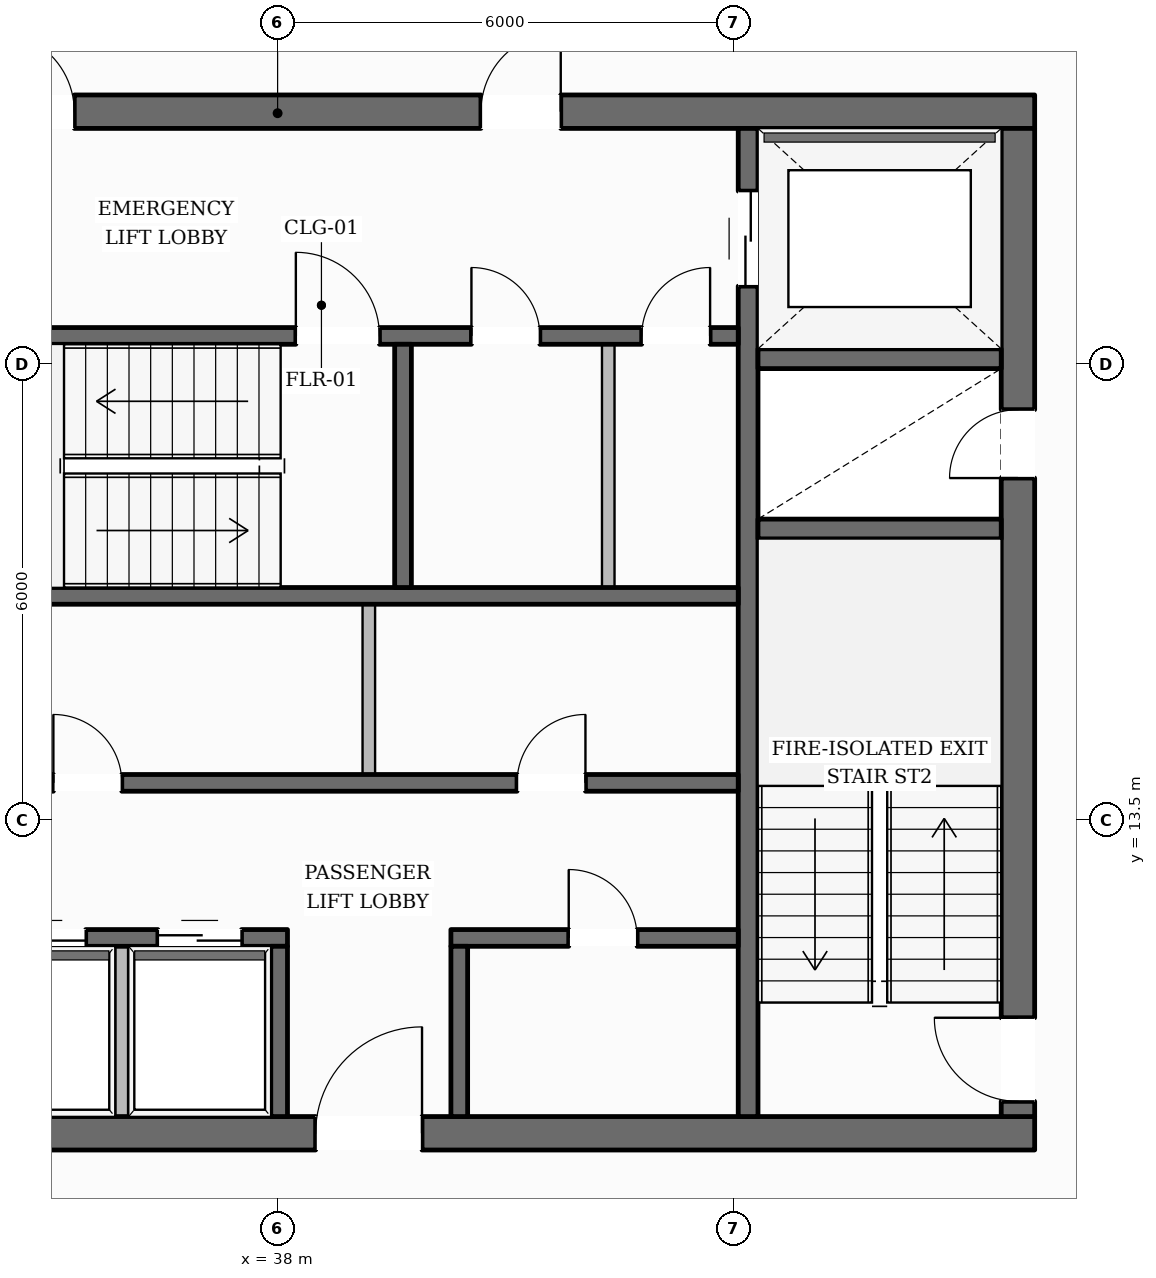
"""IFC4 building model, lengths in metres.
Left out: names, types, materials, properties, quantities, classifications, styles, units other than length and angle.
Written with IfcOpenShell. Run it as: python <this file> out.ifc"""

import sys

from ifc_helpers import new_model, si_unit, direction, frame, frame_2d, origin, place, context, subcontext, project, spatial, rectangle, extrude, element, fill, save


model = new_model("IFC4")
c1 = context("Model", 3, precision=1e-05, world=origin(), true_north=direction((0.0, 1.0)))
c2 = subcontext(c1, "Body", "Model", "MODEL_VIEW")
j1 = project(units=[si_unit("LENGTHUNIT", "METRE"), si_unit("PLANEANGLEUNIT", "RADIAN")], contexts=[c1])
p1 = place(None, origin())
s1 = spatial("IfcSite", under=j1, at=p1, CompositionType="ELEMENT")
p2 = place(p1, origin())
s2 = spatial("IfcBuilding", under=s1, at=p2, CompositionType="ELEMENT")
p3 = place(p2, frame((0.0, 0.0, 188.1)))
s3 = spatial("IfcBuildingStorey", under=s2, at=p3, CompositionType="ELEMENT", Elevation=188.1)
p4 = place(p3, frame((28.04, 9.38, 0.0), z_axis=(0.0, 0.0, 1.0), x_axis=(1.0, 0.0, 0.0)))
e1 = element("IfcWall", 1, at=p4, inside=s3, PredefinedType="SOLIDWALL", context=c2, shape_type="SweptSolid", body=[
    extrude(rectangle(XDim=19.92, YDim=0.44, at=frame_2d((9.96, 0.0))), origin(), (0.0, 0.0, 1.0), 3.6),
])
p5 = place(p4, frame((10.46, 0.0, 0.0)))
e2 = element("IfcOpeningElement", 2, at=p5, cuts=e1, PredefinedType="OPENING", context=c2, shape_type="SweptSolid", body=[
    extrude(rectangle(XDim=1.4, YDim=2.2, at=frame_2d((0.7, 1.1))), frame((0.0, 0.23, 0.0), z_axis=(0.0, -1.0, 0.0), x_axis=(1.0, 0.0, 0.0)), (0.0, 0.0, 1.0), 0.46),
])
p6 = place(p3, frame((28.04, 22.82, 0.0), z_axis=(0.0, 0.0, 1.0), x_axis=(1.0, 0.0, 0.0)))
e3 = element("IfcWall", 3, at=p6, inside=s3, PredefinedType="SOLIDWALL", context=c2, shape_type="SweptSolid", body=[
    extrude(rectangle(XDim=19.92, YDim=0.44, at=frame_2d((9.96, 0.0))), origin(), (0.0, 0.0, 1.0), 3.6),
])
p7 = place(p6, frame((6.235, 0.0, 0.0)))
e4 = element("IfcOpeningElement", 4, at=p7, cuts=e3, PredefinedType="OPENING", context=c2, shape_type="SweptSolid", body=[
    extrude(rectangle(XDim=1.05, YDim=2.15, at=frame_2d((0.525, 1.075))), frame((0.0, 0.23, 0.0), z_axis=(0.0, -1.0, 0.0), x_axis=(1.0, 0.0, 0.0)), (0.0, 0.0, 1.0), 0.46),
])
p8 = place(p6, frame((12.635, 0.0, 0.0)))
e5 = element("IfcOpeningElement", 5, at=p8, cuts=e3, PredefinedType="OPENING", context=c2, shape_type="SweptSolid", body=[
    extrude(rectangle(XDim=1.05, YDim=2.15, at=frame_2d((0.525, 1.075))), frame((0.0, 0.23, 0.0), z_axis=(0.0, -1.0, 0.0), x_axis=(1.0, 0.0, 0.0)), (0.0, 0.0, 1.0), 0.46),
])
p9 = place(p3, frame((47.74, 9.6, 0.0), z_axis=(0.0, 0.0, 1.0), x_axis=(0.0, 1.0, 0.0)))
e6 = element("IfcWall", 6, at=p9, inside=s3, PredefinedType="SOLIDWALL", context=c2, shape_type="SweptSolid", body=[
    extrude(rectangle(XDim=13.0, YDim=0.44, at=frame_2d((6.5, 0.0))), origin(), (0.0, 0.0, 1.0), 3.6),
])
p10 = place(p9, frame((0.2, 0.0, 0.0)))
e7 = element("IfcOpeningElement", 7, at=p10, cuts=e6, PredefinedType="OPENING", context=c2, shape_type="SweptSolid", body=[
    extrude(rectangle(XDim=1.1, YDim=2.15, at=frame_2d((0.55, 1.075))), frame((0.0, 0.23, 0.0), z_axis=(0.0, -1.0, 0.0), x_axis=(1.0, 0.0, 0.0)), (0.0, 0.0, 1.0), 0.46),
])
p11 = place(p9, frame((8.4, 0.0, 0.0)))
e8 = element("IfcOpeningElement", 8, at=p11, cuts=e6, PredefinedType="OPENING", context=c2, shape_type="SweptSolid", body=[
    extrude(rectangle(XDim=0.9, YDim=2.1, at=frame_2d((0.45, 1.05))), frame((0.0, 0.23, 0.0), z_axis=(0.0, -1.0, 0.0), x_axis=(1.0, 0.0, 0.0)), (0.0, 0.0, 1.0), 0.46),
])
p12 = place(p3, frame((44.19, 9.6, 0.0), z_axis=(0.0, 0.0, 1.0), x_axis=(0.0, 1.0, 0.0)))
e9 = element("IfcWall", 9, at=p12, inside=s3, PredefinedType="SHEAR", context=c2, shape_type="SweptSolid", body=[
    extrude(rectangle(XDim=13.0, YDim=0.26, at=frame_2d((6.5, 0.0))), origin(), (0.0, 0.0, 1.0), 3.6),
])
p13 = place(p12, frame((10.925, 0.0, 0.0)))
e10 = element("IfcOpeningElement", 10, at=p13, cuts=e9, PredefinedType="OPENING", context=c2, shape_type="SweptSolid", body=[
    extrude(rectangle(XDim=1.25, YDim=2.25, at=frame_2d((0.625, 1.125))), frame((0.0, 0.14, 0.0), z_axis=(0.0, -1.0, 0.0), x_axis=(1.0, 0.0, 0.0)), (0.0, 0.0, 1.0), 0.28),
])
for number, where, z_axis, x_axis in (
    (11, (44.32, 17.33, 0.0), (0.0, 0.0, 1.0), (1.0, 0.0, 0.0)),
    (12, (44.32, 19.57, 0.0), (0.0, 0.0, 1.0), (1.0, 0.0, 0.0)),
):
    element("IfcWall", number, at=place(p3, frame(where, z_axis=z_axis, x_axis=x_axis)), inside=s3, PredefinedType="SHEAR", context=c2, shape_type="SweptSolid", body=[
        extrude(rectangle(XDim=3.2, YDim=0.26, at=frame_2d((1.6, 0.0))), origin(), (0.0, 0.0, 1.0), 3.6),
    ])
p14 = place(p3, frame((31.94, 19.87, 0.0), z_axis=(0.0, 0.0, 1.0), x_axis=(1.0, 0.0, 0.0)))
e13 = element("IfcWall", 13, at=p14, inside=s3, PredefinedType="SOLIDWALL", context=c2, shape_type="SweptSolid", body=[
    extrude(rectangle(XDim=12.12, YDim=0.22, at=frame_2d((6.06, 0.0))), origin(), (0.0, 0.0, 1.0), 3.6),
])
p15 = place(p14, frame((6.3, 0.0, 0.0)))
e14 = element("IfcOpeningElement", 14, at=p15, cuts=e13, PredefinedType="OPENING", context=c2, shape_type="SweptSolid", body=[
    extrude(rectangle(XDim=1.1, YDim=2.15, at=frame_2d((0.55, 1.075))), frame((0.0, 0.12, 0.0), z_axis=(0.0, -1.0, 0.0), x_axis=(1.0, 0.0, 0.0)), (0.0, 0.0, 1.0), 0.24),
])
p16 = place(p14, frame((8.61, 0.0, 0.0)))
e15 = element("IfcOpeningElement", 15, at=p16, cuts=e13, PredefinedType="OPENING", context=c2, shape_type="SweptSolid", body=[
    extrude(rectangle(XDim=0.9, YDim=2.1, at=frame_2d((0.45, 1.05))), frame((0.0, 0.12, 0.0), z_axis=(0.0, -1.0, 0.0), x_axis=(1.0, 0.0, 0.0)), (0.0, 0.0, 1.0), 0.24),
])
p17 = place(p14, frame((10.85, 0.0, 0.0)))
e16 = element("IfcOpeningElement", 16, at=p17, cuts=e13, PredefinedType="OPENING", context=c2, shape_type="SweptSolid", body=[
    extrude(rectangle(XDim=0.9, YDim=2.1, at=frame_2d((0.45, 1.05))), frame((0.0, 0.12, 0.0), z_axis=(0.0, -1.0, 0.0), x_axis=(1.0, 0.0, 0.0)), (0.0, 0.0, 1.0), 0.24),
])
p18 = place(p3, frame((31.94, 16.45, 0.0), z_axis=(0.0, 0.0, 1.0), x_axis=(1.0, 0.0, 0.0)))
e17 = element("IfcWall", 17, at=p18, inside=s3, PredefinedType="SOLIDWALL", context=c2, shape_type="SweptSolid", body=[
    extrude(rectangle(XDim=12.12, YDim=0.22, at=frame_2d((6.06, 0.0))), origin(), (0.0, 0.0, 1.0), 3.6),
])
p19 = place(p3, frame((39.65, 16.56, 0.0), z_axis=(0.0, 0.0, 1.0), x_axis=(0.0, 1.0, 0.0)))
e18 = element("IfcWall", 18, at=p19, inside=s3, PredefinedType="SOLIDWALL", context=c2, shape_type="SweptSolid", body=[
    extrude(rectangle(XDim=3.2, YDim=0.22, at=frame_2d((1.6, 0.0))), origin(), (0.0, 0.0, 1.0), 3.6),
])
p20 = place(p3, frame((31.94, 13.99, 0.0), z_axis=(0.0, 0.0, 1.0), x_axis=(1.0, 0.0, 0.0)))
e19 = element("IfcWall", 19, at=p20, inside=s3, PredefinedType="SOLIDWALL", context=c2, shape_type="SweptSolid", body=[
    extrude(rectangle(XDim=12.12, YDim=0.22, at=frame_2d((6.06, 0.0))), origin(), (0.0, 0.0, 1.0), 3.6),
])
p21 = place(p20, frame((3.11, 0.0, 0.0)))
e20 = element("IfcOpeningElement", 20, at=p21, cuts=e19, PredefinedType="OPENING", context=c2, shape_type="SweptSolid", body=[
    extrude(rectangle(XDim=0.9, YDim=2.1, at=frame_2d((0.45, 1.05))), frame((0.0, 0.12, 0.0), z_axis=(0.0, -1.0, 0.0), x_axis=(1.0, 0.0, 0.0)), (0.0, 0.0, 1.0), 0.24),
])
p22 = place(p20, frame((9.21, 0.0, 0.0)))
e21 = element("IfcOpeningElement", 21, at=p22, cuts=e19, PredefinedType="OPENING", context=c2, shape_type="SweptSolid", body=[
    extrude(rectangle(XDim=0.9, YDim=2.1, at=frame_2d((0.45, 1.05))), frame((0.0, 0.12, 0.0), z_axis=(0.0, -1.0, 0.0), x_axis=(1.0, 0.0, 0.0)), (0.0, 0.0, 1.0), 0.24),
])
p23 = place(p3, frame((31.94, 11.95, 0.0), z_axis=(0.0, 0.0, 1.0), x_axis=(1.0, 0.0, 0.0)))
e22 = element("IfcWall", 22, at=p23, inside=s3, PredefinedType="SOLIDWALL", context=c2, shape_type="SweptSolid", body=[
    extrude(rectangle(XDim=6.19, YDim=0.22, at=frame_2d((3.095, 0.0))), origin(), (0.0, 0.0, 1.0), 3.6),
])
p24 = place(p23, frame((0.385, 0.0, 0.0)))
e23 = element("IfcOpeningElement", 23, at=p24, cuts=e22, PredefinedType="OPENING", context=c2, shape_type="SweptSolid", body=[
    extrude(rectangle(XDim=1.1, YDim=2.2, at=frame_2d((0.55, 1.1))), frame((0.0, 0.12, 0.0), z_axis=(0.0, -1.0, 0.0), x_axis=(1.0, 0.0, 0.0)), (0.0, 0.0, 1.0), 0.24),
])
p25 = place(p23, frame((2.435, 0.0, 0.0)))
e24 = element("IfcOpeningElement", 24, at=p25, cuts=e22, PredefinedType="OPENING", context=c2, shape_type="SweptSolid", body=[
    extrude(rectangle(XDim=1.1, YDim=2.2, at=frame_2d((0.55, 1.1))), frame((0.0, 0.12, 0.0), z_axis=(0.0, -1.0, 0.0), x_axis=(1.0, 0.0, 0.0)), (0.0, 0.0, 1.0), 0.24),
])
p26 = place(p23, frame((4.485, 0.0, 0.0)))
e25 = element("IfcOpeningElement", 25, at=p26, cuts=e22, PredefinedType="OPENING", context=c2, shape_type="SweptSolid", body=[
    extrude(rectangle(XDim=1.1, YDim=2.2, at=frame_2d((0.55, 1.1))), frame((0.0, 0.12, 0.0), z_axis=(0.0, -1.0, 0.0), x_axis=(1.0, 0.0, 0.0)), (0.0, 0.0, 1.0), 0.24),
])
p27 = place(p3, frame((40.28, 11.95, 0.0), z_axis=(0.0, 0.0, 1.0), x_axis=(1.0, 0.0, 0.0)))
e26 = element("IfcWall", 26, at=p27, inside=s3, PredefinedType="SOLIDWALL", context=c2, shape_type="SweptSolid", body=[
    extrude(rectangle(XDim=3.78, YDim=0.22, at=frame_2d((1.89, 0.0))), origin(), (0.0, 0.0, 1.0), 3.6),
])
p28 = place(p27, frame((1.55, 0.0, 0.0)))
e27 = element("IfcOpeningElement", 27, at=p28, cuts=e26, PredefinedType="OPENING", context=c2, shape_type="SweptSolid", body=[
    extrude(rectangle(XDim=0.9, YDim=2.1, at=frame_2d((0.45, 1.05))), frame((0.0, 0.12, 0.0), z_axis=(0.0, -1.0, 0.0), x_axis=(1.0, 0.0, 0.0)), (0.0, 0.0, 1.0), 0.24),
])
for number, where, z_axis, x_axis in (
    (28, (38.02, 9.6, 0.0), (0.0, 0.0, 1.0), (0.0, 1.0, 0.0)),
    (29, (40.39, 9.6, 0.0), (0.0, 0.0, 1.0), (0.0, 1.0, 0.0)),
):
    element("IfcWall", number, at=place(p3, frame(where, z_axis=z_axis, x_axis=x_axis)), inside=s3, PredefinedType="SOLIDWALL", context=c2, shape_type="SweptSolid", body=[
        extrude(rectangle(XDim=2.24, YDim=0.22, at=frame_2d((1.12, 0.0))), origin(), (0.0, 0.0, 1.0), 3.6),
    ])
p29 = place(p3, frame((42.575, 44.272, 0.0), z_axis=(0.0, 0.0, 1.0), x_axis=(0.503934681705, -0.863741764982, 0.0)))
e30 = element("IfcWall", 30, at=p29, inside=s3, PredefinedType="STANDARD", context=c2, shape_type="SweptSolid", body=[
    extrude(rectangle(XDim=37.915, YDim=0.35, at=frame_2d((18.958, 0.0))), origin(), (0.0, 0.0, 1.0), 3.132),
])
p30 = place(p29, frame((33.633, 0.0, 0.65)))
e31 = element("IfcOpeningElement", 31, at=p30, cuts=e30, PredefinedType="OPENING", context=c2, shape_type="SweptSolid", body=[
    extrude(rectangle(XDim=1.45, YDim=1.75, at=frame_2d((0.725, 0.875))), frame((0.0, 0.185, 0.0), z_axis=(0.0, -1.0, 0.0), x_axis=(1.0, 0.0, 0.0)), (0.0, 0.0, 1.0), 0.37),
])
p31 = place(p29, frame((27.472, 0.0, 0.65)))
e32 = element("IfcOpeningElement", 32, at=p31, cuts=e30, PredefinedType="OPENING", context=c2, shape_type="SweptSolid", body=[
    extrude(rectangle(XDim=1.45, YDim=1.75, at=frame_2d((0.725, 0.875))), frame((0.0, 0.185, 0.0), z_axis=(0.0, -1.0, 0.0), x_axis=(1.0, 0.0, 0.0)), (0.0, 0.0, 1.0), 0.37),
])
p32 = place(p29, frame((15.15, 0.0, 0.65)))
e33 = element("IfcOpeningElement", 33, at=p32, cuts=e30, PredefinedType="OPENING", context=c2, shape_type="SweptSolid", body=[
    extrude(rectangle(XDim=1.45, YDim=1.75, at=frame_2d((0.725, 0.875))), frame((0.0, 0.185, 0.0), z_axis=(0.0, -1.0, 0.0), x_axis=(1.0, 0.0, 0.0)), (0.0, 0.0, 1.0), 0.37),
])
p33 = place(p29, frame((8.989, 0.0, 0.65)))
e34 = element("IfcOpeningElement", 34, at=p33, cuts=e30, PredefinedType="OPENING", context=c2, shape_type="SweptSolid", body=[
    extrude(rectangle(XDim=1.45, YDim=1.75, at=frame_2d((0.725, 0.875))), frame((0.0, 0.185, 0.0), z_axis=(0.0, -1.0, 0.0), x_axis=(1.0, 0.0, 0.0)), (0.0, 0.0, 1.0), 0.37),
])
p34 = place(p29, frame((2.828, 0.0, 0.65)))
e35 = element("IfcOpeningElement", 35, at=p34, cuts=e30, PredefinedType="OPENING", context=c2, shape_type="SweptSolid", body=[
    extrude(rectangle(XDim=1.45, YDim=1.75, at=frame_2d((0.725, 0.875))), frame((0.0, 0.185, 0.0), z_axis=(0.0, -1.0, 0.0), x_axis=(1.0, 0.0, 0.0)), (0.0, 0.0, 1.0), 0.37),
])
p35 = place(p3, frame((35.95, 9.52, 0.0), z_axis=(0.0, 0.0, 1.0), x_axis=(0.0, 1.0, 0.0)))
e36 = element("IfcWall", 36, at=p35, inside=s3, PredefinedType="PARTITIONING", context=c2, shape_type="SweptSolid", body=[
    extrude(rectangle(XDim=2.32, YDim=0.165, at=frame_2d((1.16, 0.0))), origin(), (0.0, 0.0, 1.0), 3.6),
])
p36 = place(p3, frame((39.2, 14.1, 0.0), z_axis=(0.0, 0.0, 1.0), x_axis=(0.0, 1.0, 0.0)))
e37 = element("IfcWall", 37, at=p36, inside=s3, PredefinedType="PARTITIONING", context=c2, shape_type="SweptSolid", body=[
    extrude(rectangle(XDim=2.24, YDim=0.165, at=frame_2d((1.12, 0.0))), origin(), (0.0, 0.0, 1.0), 3.6),
])
p37 = place(p3, frame((42.35, 16.56, 0.0), z_axis=(0.0, 0.0, 1.0), x_axis=(0.0, 1.0, 0.0)))
e38 = element("IfcWall", 38, at=p37, inside=s3, PredefinedType="PARTITIONING", context=c2, shape_type="SweptSolid", body=[
    extrude(rectangle(XDim=3.2, YDim=0.165, at=frame_2d((1.6, 0.0))), origin(), (0.0, 0.0, 1.0), 3.6),
])
p38 = place(p10, origin())
e39 = element("IfcDoor", 39, at=p38, inside=s3, OperationType="SINGLE_SWING_RIGHT", PredefinedType="DOOR", context=c2, shape_type="SweptSolid", body=[
    extrude(rectangle(XDim=1.1, YDim=2.15, at=frame_2d((0.55, 1.075))), frame((0.0, 0.025, 0.0), z_axis=(0.0, -1.0, 0.0), x_axis=(1.0, 0.0, 0.0)), (0.0, 0.0, 1.0), 0.05),
])
fill(e7, e39)
p39 = place(p15, origin())
e40 = element("IfcDoor", 40, at=p39, inside=s3, OperationType="SINGLE_SWING_LEFT", PredefinedType="DOOR", context=c2, shape_type="SweptSolid", body=[
    extrude(rectangle(XDim=1.1, YDim=2.15, at=frame_2d((0.55, 1.075))), frame((0.0, 0.025, 0.0), z_axis=(0.0, -1.0, 0.0), x_axis=(1.0, 0.0, 0.0)), (0.0, 0.0, 1.0), 0.05),
])
fill(e14, e40)
p40 = place(p11, origin())
e41 = element("IfcDoor", 41, at=p40, inside=s3, OperationType="SINGLE_SWING_LEFT", PredefinedType="DOOR", context=c2, shape_type="SweptSolid", body=[
    extrude(rectangle(XDim=0.9, YDim=2.1, at=frame_2d((0.45, 1.05))), frame((0.0, 0.025, 0.0), z_axis=(0.0, -1.0, 0.0), x_axis=(1.0, 0.0, 0.0)), (0.0, 0.0, 1.0), 0.05),
])
fill(e8, e41)
p41 = place(p7, origin())
e42 = element("IfcDoor", 42, at=p41, inside=s3, OperationType="SINGLE_SWING_LEFT", PredefinedType="DOOR", context=c2, shape_type="SweptSolid", body=[
    extrude(rectangle(XDim=1.05, YDim=2.15, at=frame_2d((0.525, 1.075))), frame((0.0, 0.025, 0.0), z_axis=(0.0, -1.0, 0.0), x_axis=(1.0, 0.0, 0.0)), (0.0, 0.0, 1.0), 0.05),
])
fill(e4, e42)
p42 = place(p8, origin())
e43 = element("IfcDoor", 43, at=p42, inside=s3, OperationType="SINGLE_SWING_RIGHT", PredefinedType="DOOR", context=c2, shape_type="SweptSolid", body=[
    extrude(rectangle(XDim=1.05, YDim=2.15, at=frame_2d((0.525, 1.075))), frame((0.0, 0.025, 0.0), z_axis=(0.0, -1.0, 0.0), x_axis=(1.0, 0.0, 0.0)), (0.0, 0.0, 1.0), 0.05),
])
fill(e5, e43)
p43 = place(p13, origin())
e44 = element("IfcDoor", 44, at=p43, inside=s3, OperationType="DOUBLE_DOOR_SLIDING", PredefinedType="DOOR", context=c2, shape_type="SweptSolid", body=[
    extrude(rectangle(XDim=1.25, YDim=2.25, at=frame_2d((0.625, 1.125))), frame((0.0, 0.025, 0.0), z_axis=(0.0, -1.0, 0.0), x_axis=(1.0, 0.0, 0.0)), (0.0, 0.0, 1.0), 0.05),
])
fill(e10, e44)
p44 = place(p5, origin())
e45 = element("IfcDoor", 45, at=p44, inside=s3, OperationType="SINGLE_SWING_RIGHT", PredefinedType="DOOR", context=c2, shape_type="SweptSolid", body=[
    extrude(rectangle(XDim=1.4, YDim=2.2, at=frame_2d((0.7, 1.1))), frame((0.0, 0.025, 0.0), z_axis=(0.0, -1.0, 0.0), x_axis=(1.0, 0.0, 0.0)), (0.0, 0.0, 1.0), 0.05),
])
fill(e2, e45)
p45 = place(p25, origin())
e46 = element("IfcDoor", 46, at=p45, inside=s3, OperationType="DOUBLE_DOOR_SLIDING", PredefinedType="DOOR", context=c2, shape_type="SweptSolid", body=[
    extrude(rectangle(XDim=1.1, YDim=2.2, at=frame_2d((0.55, 1.1))), frame((0.0, 0.025, 0.0), z_axis=(0.0, -1.0, 0.0), x_axis=(1.0, 0.0, 0.0)), (0.0, 0.0, 1.0), 0.05),
])
fill(e24, e46)
p46 = place(p26, origin())
e47 = element("IfcDoor", 47, at=p46, inside=s3, OperationType="DOUBLE_DOOR_SLIDING", PredefinedType="DOOR", context=c2, shape_type="SweptSolid", body=[
    extrude(rectangle(XDim=1.1, YDim=2.2, at=frame_2d((0.55, 1.1))), frame((0.0, 0.025, 0.0), z_axis=(0.0, -1.0, 0.0), x_axis=(1.0, 0.0, 0.0)), (0.0, 0.0, 1.0), 0.05),
])
fill(e25, e47)
p47 = place(p21, origin())
e48 = element("IfcDoor", 48, at=p47, inside=s3, OperationType="SINGLE_SWING_LEFT", PredefinedType="DOOR", context=c2, shape_type="SweptSolid", body=[
    extrude(rectangle(XDim=0.9, YDim=2.1, at=frame_2d((0.45, 1.05))), frame((0.0, 0.025, 0.0), z_axis=(0.0, -1.0, 0.0), x_axis=(1.0, 0.0, 0.0)), (0.0, 0.0, 1.0), 0.05),
])
fill(e20, e48)
p48 = place(p22, origin())
e49 = element("IfcDoor", 49, at=p48, inside=s3, OperationType="SINGLE_SWING_RIGHT", PredefinedType="DOOR", context=c2, shape_type="SweptSolid", body=[
    extrude(rectangle(XDim=0.9, YDim=2.1, at=frame_2d((0.45, 1.05))), frame((0.0, 0.025, 0.0), z_axis=(0.0, -1.0, 0.0), x_axis=(1.0, 0.0, 0.0)), (0.0, 0.0, 1.0), 0.05),
])
fill(e21, e49)
p49 = place(p16, origin())
e50 = element("IfcDoor", 50, at=p49, inside=s3, OperationType="SINGLE_SWING_LEFT", PredefinedType="DOOR", context=c2, shape_type="SweptSolid", body=[
    extrude(rectangle(XDim=0.9, YDim=2.1, at=frame_2d((0.45, 1.05))), frame((0.0, 0.025, 0.0), z_axis=(0.0, -1.0, 0.0), x_axis=(1.0, 0.0, 0.0)), (0.0, 0.0, 1.0), 0.05),
])
fill(e15, e50)
p50 = place(p17, origin())
e51 = element("IfcDoor", 51, at=p50, inside=s3, OperationType="SINGLE_SWING_RIGHT", PredefinedType="DOOR", context=c2, shape_type="SweptSolid", body=[
    extrude(rectangle(XDim=0.9, YDim=2.1, at=frame_2d((0.45, 1.05))), frame((0.0, 0.025, 0.0), z_axis=(0.0, -1.0, 0.0), x_axis=(1.0, 0.0, 0.0)), (0.0, 0.0, 1.0), 0.05),
])
fill(e16, e51)
p51 = place(p28, origin())
e52 = element("IfcDoor", 52, at=p51, inside=s3, OperationType="SINGLE_SWING_LEFT", PredefinedType="DOOR", context=c2, shape_type="SweptSolid", body=[
    extrude(rectangle(XDim=0.9, YDim=2.1, at=frame_2d((0.45, 1.05))), frame((0.0, 0.025, 0.0), z_axis=(0.0, -1.0, 0.0), x_axis=(1.0, 0.0, 0.0)), (0.0, 0.0, 1.0), 0.05),
])
fill(e27, e52)
save(model, sys.argv[1])
